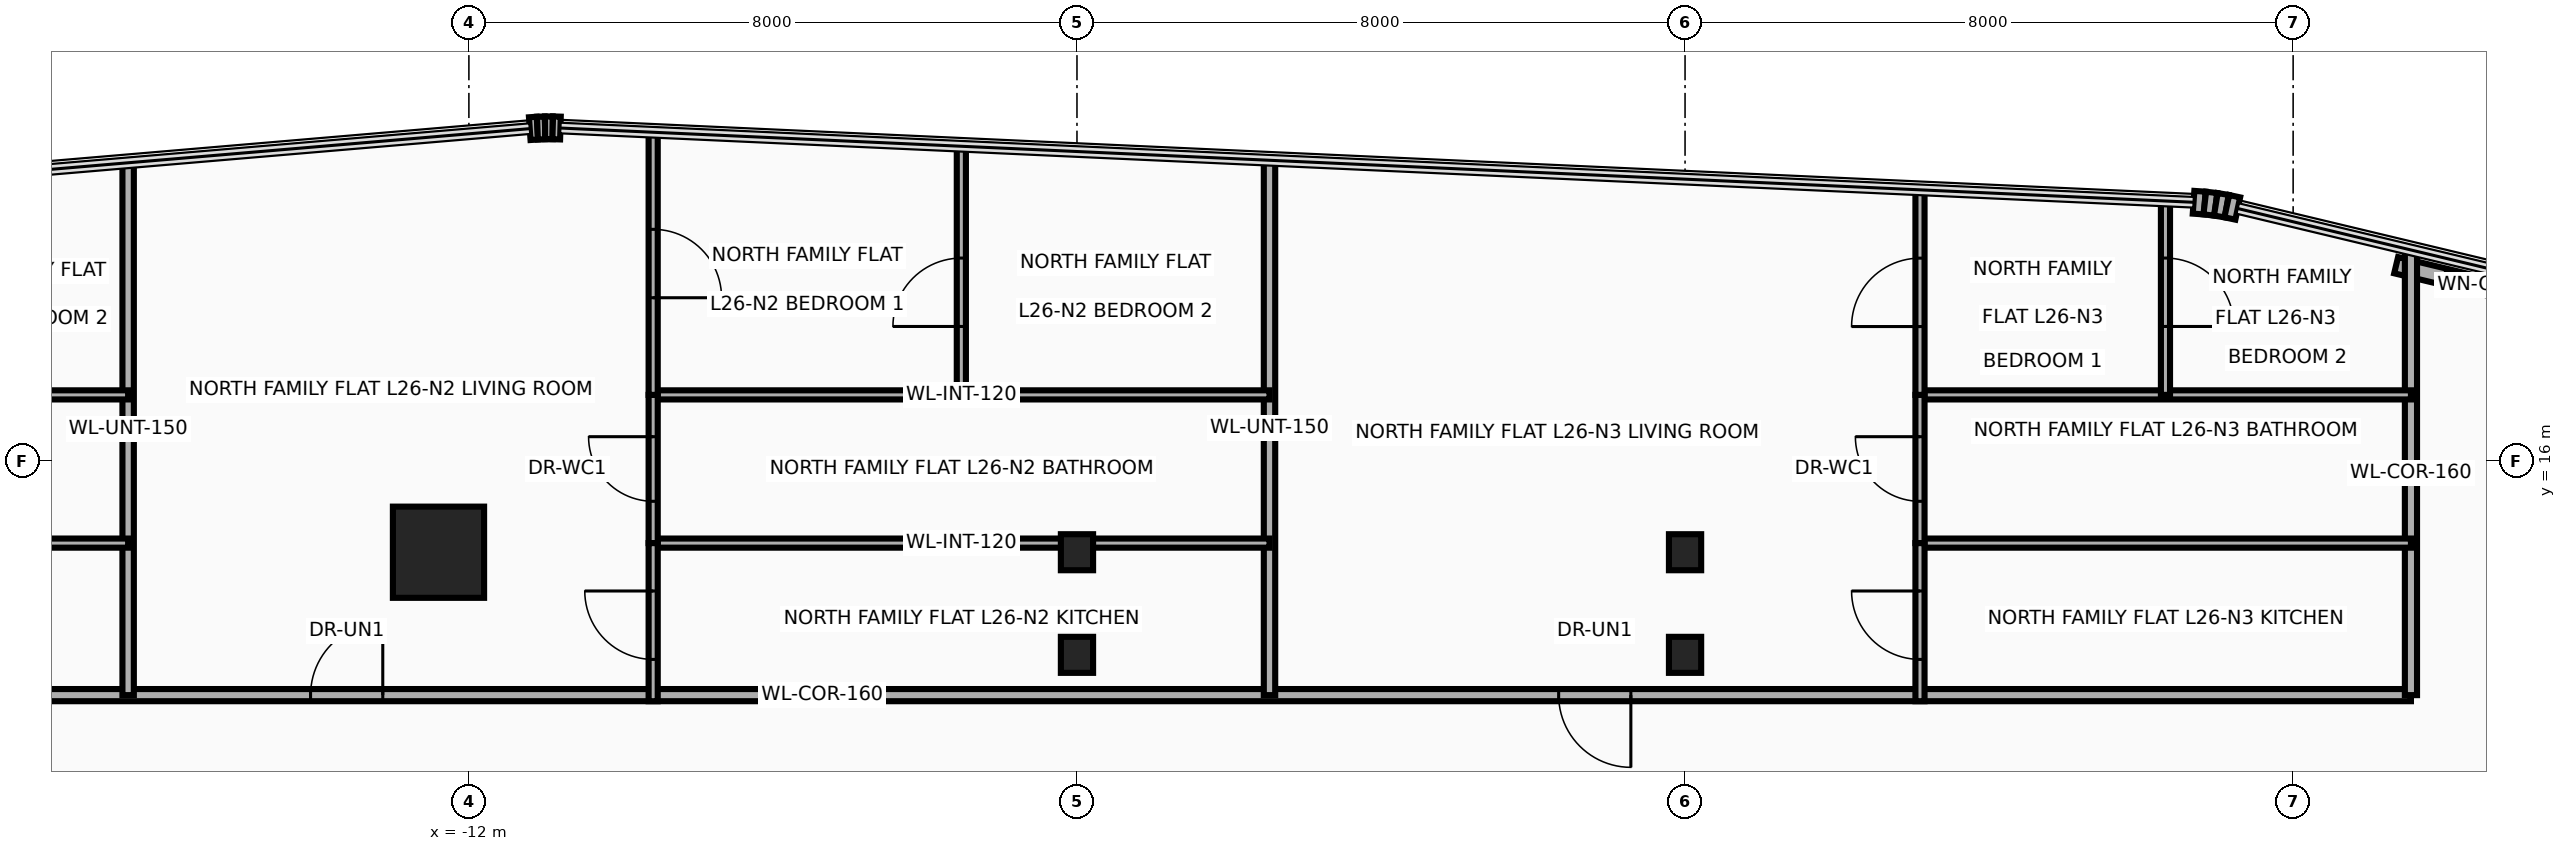
"""IFC4 building model, lengths in metres.
Left out: names, types, materials, properties, quantities, classifications, styles, units other than length and angle.
Written with IfcOpenShell. Run it as: python <this file> out.ifc"""

import sys

from ifc_helpers import new_model, si_unit, direction, frame, frame_2d, origin, origin_2d, place, context, subcontext, project, spatial, rectangle, i_section, extrude, source, transform, mapped, element, fill, save


model = new_model("IFC4")
c1 = context("Model", 3, precision=1e-05, world=origin(), true_north=direction((0.0, 1.0)))
c2 = subcontext(c1, "Body", "Model", "MODEL_VIEW")
j1 = project(units=[si_unit("LENGTHUNIT", "METRE"), si_unit("PLANEANGLEUNIT", "RADIAN")], contexts=[c1])
p1 = place(None, origin())
s1 = spatial("IfcSite", under=j1, at=p1, CompositionType="ELEMENT")
p2 = place(p1, origin())
s2 = spatial("IfcBuilding", under=s1, at=p2, CompositionType="ELEMENT")
p3 = place(p2, frame((0.0, 0.0, 105.7)))
s3 = spatial("IfcBuildingStorey", under=s2, at=p3, CompositionType="ELEMENT", Elevation=105.7)
m1 = source(origin(), c2, "Body", "SweptSolid", [
    extrude(rectangle(XDim=1.2, YDim=1.2, at=origin_2d()), origin(), (0.0, 0.0, 1.0), 3.7),
])
p4 = place(p3, frame((-12.4, 14.8, 0.0), z_axis=(0.0, 0.0, 1.0), x_axis=(1.0, 0.0, 0.0)))
e1 = element("IfcColumn", 1, at=p4, inside=s3, PredefinedType="COLUMN", context=c2, shape_type="MappedRepresentation", body=[
    mapped(m1, transform((0.0, 0.0, 0.0), x_axis=(1.0, 0.0, 0.0), y_axis=(0.0, 1.0, 0.0), z_axis=(0.0, 0.0, 1.0), scale=1.0)),
])
m2 = source(origin(), c2, "Body", "SweptSolid", [
    extrude(i_section(OverallWidth=0.424, OverallDepth=0.474, WebThickness=0.048, FlangeThickness=0.077, at=origin_2d()), origin(), (0.0, 0.0, 1.0), 3.7),
])
for number, where, z_axis, x_axis in (
    (2, (-4.0, 13.45, 0.0), (0.0, 0.0, 1.0), (1.0, 0.0, 0.0)),
    (3, (-4.0, 14.8, 0.0), (0.0, 0.0, 1.0), (1.0, 0.0, 0.0)),
    (4, (4.0, 13.45, 0.0), (0.0, 0.0, 1.0), (1.0, 0.0, 0.0)),
    (5, (4.0, 14.8, 0.0), (0.0, 0.0, 1.0), (1.0, 0.0, 0.0)),
):
    element("IfcColumn", number, at=place(p3, frame(where, z_axis=z_axis, x_axis=x_axis)), inside=s3, PredefinedType="COLUMN", context=c2, shape_type="MappedRepresentation", body=[
        mapped(m2, transform((0.0, 0.0, 0.0), x_axis=(1.0, 0.0, 0.0), y_axis=(0.0, 1.0, 0.0), z_axis=(0.0, 0.0, 1.0), scale=1.0)),
    ])
p5 = place(p3, frame((-11.199, 20.373, 0.0), z_axis=(0.0, 0.0, 1.0), x_axis=(0.997567332166, 0.069709524416, 0.0)))
e6 = element("IfcWall", 6, at=p5, inside=s3, PredefinedType="SOLIDWALL", context=c2, shape_type="SweptSolid", body=[
    extrude(rectangle(XDim=0.102, YDim=0.3, at=frame_2d((0.051, 0.0))), origin(), (0.0, 0.0, 1.0), 3.46),
])
p6 = place(p3, frame((-11.098, 20.38, 0.0), z_axis=(0.0, 0.0, 1.0), x_axis=(0.999334672785, 0.03647206835, 0.0)))
e7 = element("IfcWall", 7, at=p6, inside=s3, PredefinedType="SOLIDWALL", context=c2, shape_type="SweptSolid", body=[
    extrude(rectangle(XDim=0.1, YDim=0.3, at=frame_2d((0.05, 0.0))), origin(), (0.0, 0.0, 1.0), 3.46),
])
p7 = place(p3, frame((-10.998, 20.383, 0.0), z_axis=(0.0, 0.0, 1.0), x_axis=(0.999997054401, 0.002427177317, 0.0)))
e8 = element("IfcWall", 8, at=p7, inside=s3, PredefinedType="SOLIDWALL", context=c2, shape_type="SweptSolid", body=[
    extrude(rectangle(XDim=0.101, YDim=0.3, at=frame_2d((0.05, 0.0))), origin(), (0.0, 0.0, 1.0), 3.46),
])
p8 = place(p3, frame((-10.897, 20.384, 0.0), z_axis=(0.0, 0.0, 1.0), x_axis=(0.999584209171, -0.02883415988, 0.0)))
e9 = element("IfcWall", 9, at=p8, inside=s3, PredefinedType="SOLIDWALL", context=c2, shape_type="SweptSolid", body=[
    extrude(rectangle(XDim=0.102, YDim=0.3, at=frame_2d((0.051, 0.0))), origin(), (0.0, 0.0, 1.0), 3.46),
])
p9 = place(p3, frame((10.69, 19.404, 0.0), z_axis=(0.0, 0.0, 1.0), x_axis=(0.99758310784, -0.069483400546, 0.0)))
e10 = element("IfcWall", 10, at=p9, inside=s3, PredefinedType="SOLIDWALL", context=c2, shape_type="SweptSolid", body=[
    extrude(rectangle(XDim=0.147, YDim=0.3, at=frame_2d((0.074, 0.0))), origin(), (0.0, 0.0, 1.0), 3.46),
])
for number, where, z_axis, x_axis in (
    (11, (10.837, 19.394, 0.0), (0.0, 0.0, 1.0), (0.993, -0.117, 0.0)),
    (12, (10.983, 19.377, 0.0), (0.0, 0.0, 1.0), (0.987, -0.163, 0.0)),
):
    element("IfcWall", number, at=place(p3, frame(where, z_axis=z_axis, x_axis=x_axis)), inside=s3, PredefinedType="SOLIDWALL", context=c2, shape_type="SweptSolid", body=[
        extrude(rectangle(XDim=0.146, YDim=0.3, at=frame_2d((0.073, 0.0))), origin(), (0.0, 0.0, 1.0), 3.46),
    ])
p10 = place(p3, frame((11.127, 19.353, 0.0), z_axis=(0.0, 0.0, 1.0), x_axis=(0.978019841688, -0.208511844421, 0.0)))
e13 = element("IfcWall", 13, at=p10, inside=s3, PredefinedType="SOLIDWALL", context=c2, shape_type="SweptSolid", body=[
    extrude(rectangle(XDim=0.147, YDim=0.3, at=frame_2d((0.074, 0.0))), origin(), (0.0, 0.0, 1.0), 3.46),
])
p11 = place(p3, frame((13.355, 18.576, 0.0), z_axis=(0.0, 0.0, 1.0), x_axis=(0.97252211384, -0.232810519721, 0.0)))
e14 = element("IfcWall", 14, at=p11, inside=s3, PredefinedType="SOLIDWALL", context=c2, shape_type="SweptSolid", body=[
    extrude(rectangle(XDim=2.2, YDim=0.22, at=frame_2d((1.1, 0.0))), origin(), (0.0, 0.0, 1.0), 3.46),
])
p12 = place(p11, frame((0.65, 0.0, 0.95)))
e15 = element("IfcOpeningElement", 15, at=p12, cuts=e14, PredefinedType="OPENING", context=c2, shape_type="SweptSolid", body=[
    extrude(rectangle(XDim=0.9, YDim=1.3, at=frame_2d((0.45, 0.65))), frame((0.0, 0.125, 0.0), z_axis=(0.0, -1.0, 0.0), x_axis=(1.0, 0.0, 0.0)), (0.0, 0.0, 1.0), 0.25),
])
p13 = place(p3, frame((-28.25, 12.92, 0.0), z_axis=(0.0, 0.0, 1.0), x_axis=(1.0, 0.0, 0.0)))
e16 = element("IfcWall", 16, at=p13, inside=s3, PredefinedType="PARTITIONING", context=c2, shape_type="SweptSolid", body=[
    extrude(rectangle(XDim=41.8, YDim=0.16, at=frame_2d((20.9, 0.0))), origin(), (0.0, 0.0, 1.0), 2.666),
])
p14 = place(p13, frame((1.456, 0.0, 0.0)))
e17 = element("IfcOpeningElement", 17, at=p14, cuts=e16, PredefinedType="OPENING", context=c2, shape_type="SweptSolid", body=[
    extrude(rectangle(XDim=0.95, YDim=2.15, at=frame_2d((0.475, 1.075))), frame((0.0, 0.095, 0.0), z_axis=(0.0, -1.0, 0.0), x_axis=(1.0, 0.0, 0.0)), (0.0, 0.0, 1.0), 0.19),
])
p15 = place(p13, frame((14.167, 0.0, 0.0)))
e18 = element("IfcOpeningElement", 18, at=p15, cuts=e16, PredefinedType="OPENING", context=c2, shape_type="SweptSolid", body=[
    extrude(rectangle(XDim=0.95, YDim=2.15, at=frame_2d((0.475, 1.075))), frame((0.0, 0.095, 0.0), z_axis=(0.0, -1.0, 0.0), x_axis=(1.0, 0.0, 0.0)), (0.0, 0.0, 1.0), 0.19),
])
p16 = place(p13, frame((30.587, 0.0, 0.0)))
e19 = element("IfcOpeningElement", 19, at=p16, cuts=e16, PredefinedType="OPENING", context=c2, shape_type="SweptSolid", body=[
    extrude(rectangle(XDim=0.95, YDim=2.15, at=frame_2d((0.475, 1.075))), frame((0.0, 0.095, 0.0), z_axis=(0.0, -1.0, 0.0), x_axis=(1.0, 0.0, 0.0)), (0.0, 0.0, 1.0), 0.19),
])
p17 = place(p3, frame((13.55, 12.92, 0.0), z_axis=(0.0, 0.0, 1.0), x_axis=(0.0, 1.0, 0.0)))
e20 = element("IfcWall", 20, at=p17, inside=s3, PredefinedType="PARTITIONING", context=c2, shape_type="SweptSolid", body=[
    extrude(rectangle(XDim=5.857, YDim=0.16, at=frame_2d((2.928, 0.0))), origin(), (0.0, 0.0, 1.0), 2.666),
])
p18 = place(p3, frame((-16.483, 12.92, 0.0), z_axis=(0.0, 0.0, 1.0), x_axis=(0.0, 1.0, 0.0)))
e21 = element("IfcWall", 21, at=p18, inside=s3, PredefinedType="PARTITIONING", context=c2, shape_type="SweptSolid", body=[
    extrude(rectangle(XDim=7.004, YDim=0.15, at=frame_2d((3.502, 0.0))), origin(), (0.0, 0.0, 1.0), 2.666),
])
p19 = place(p3, frame((-1.467, 12.92, 0.0), z_axis=(0.0, 0.0, 1.0), x_axis=(0.0, 1.0, 0.0)))
e22 = element("IfcWall", 22, at=p19, inside=s3, PredefinedType="PARTITIONING", context=c2, shape_type="SweptSolid", body=[
    extrude(rectangle(XDim=7.037, YDim=0.15, at=frame_2d((3.518, 0.0))), origin(), (0.0, 0.0, 1.0), 2.666),
])
p20 = place(p3, frame((-24.387, 14.92, 0.0), z_axis=(0.0, 0.0, 1.0), x_axis=(1.0, 0.0, 0.0)))
e23 = element("IfcWall", 23, at=p20, inside=s3, PredefinedType="PARTITIONING", context=c2, shape_type="SweptSolid", body=[
    extrude(rectangle(XDim=7.904, YDim=0.12, at=frame_2d((3.952, 0.0))), origin(), (0.0, 0.0, 1.0), 2.666),
])
p21 = place(p3, frame((-24.387, 16.87, 0.0), z_axis=(0.0, 0.0, 1.0), x_axis=(1.0, 0.0, 0.0)))
e24 = element("IfcWall", 24, at=p21, inside=s3, PredefinedType="PARTITIONING", context=c2, shape_type="SweptSolid", body=[
    extrude(rectangle(XDim=7.904, YDim=0.12, at=frame_2d((3.952, 0.0))), origin(), (0.0, 0.0, 1.0), 3.46),
])
p22 = place(p3, frame((-9.576, 14.92, 0.0), z_axis=(0.0, 0.0, 1.0), x_axis=(1.0, 0.0, 0.0)))
e25 = element("IfcWall", 25, at=p22, inside=s3, PredefinedType="PARTITIONING", context=c2, shape_type="SweptSolid", body=[
    extrude(rectangle(XDim=8.109, YDim=0.12, at=frame_2d((4.054, 0.0))), origin(), (0.0, 0.0, 1.0), 2.666),
])
p23 = place(p3, frame((-9.576, 16.87, 0.0), z_axis=(0.0, 0.0, 1.0), x_axis=(1.0, 0.0, 0.0)))
e26 = element("IfcWall", 26, at=p23, inside=s3, PredefinedType="PARTITIONING", context=c2, shape_type="SweptSolid", body=[
    extrude(rectangle(XDim=8.109, YDim=0.12, at=frame_2d((4.054, 0.0))), origin(), (0.0, 0.0, 1.0), 3.46),
])
p24 = place(p3, frame((-9.576, 14.92, 0.0), z_axis=(0.0, 0.0, 1.0), x_axis=(0.0, 1.0, 0.0)))
e27 = element("IfcWall", 27, at=p24, inside=s3, PredefinedType="PARTITIONING", context=c2, shape_type="SweptSolid", body=[
    extrude(rectangle(XDim=1.95, YDim=0.12, at=frame_2d((0.975, 0.0))), origin(), (0.0, 0.0, 1.0), 2.666),
])
p25 = place(p24, frame((0.55, 0.0, 0.0)))
e28 = element("IfcOpeningElement", 28, at=p25, cuts=e27, PredefinedType="OPENING", context=c2, shape_type="SweptSolid", body=[
    extrude(rectangle(XDim=0.85, YDim=2.1, at=frame_2d((0.425, 1.05))), frame((0.0, 0.075, 0.0), z_axis=(0.0, -1.0, 0.0), x_axis=(1.0, 0.0, 0.0)), (0.0, 0.0, 1.0), 0.15),
])
p26 = place(p3, frame((-9.576, 12.84, 0.0), z_axis=(0.0, 0.0, 1.0), x_axis=(0.0, 1.0, 0.0)))
e29 = element("IfcWall", 29, at=p26, inside=s3, PredefinedType="PARTITIONING", context=c2, shape_type="SweptSolid", body=[
    extrude(rectangle(XDim=2.08, YDim=0.12, at=frame_2d((1.04, 0.0))), origin(), (0.0, 0.0, 1.0), 2.666),
])
p27 = place(p26, frame((0.55, 0.0, 0.0)))
e30 = element("IfcOpeningElement", 30, at=p27, cuts=e29, PredefinedType="OPENING", context=c2, shape_type="SweptSolid", body=[
    extrude(rectangle(XDim=0.9, YDim=2.1, at=frame_2d((0.45, 1.05))), frame((0.0, 0.075, 0.0), z_axis=(0.0, -1.0, 0.0), x_axis=(1.0, 0.0, 0.0)), (0.0, 0.0, 1.0), 0.15),
])
p28 = place(p3, frame((-9.576, 16.87, 0.0), z_axis=(0.0, 0.0, 1.0), x_axis=(0.0, 1.0, 0.0)))
e31 = element("IfcWall", 31, at=p28, inside=s3, PredefinedType="PARTITIONING", context=c2, shape_type="SweptSolid", body=[
    extrude(rectangle(XDim=3.455, YDim=0.12, at=frame_2d((1.728, 0.0))), origin(), (0.0, 0.0, 1.0), 3.46),
])
p29 = place(p28, frame((1.278, 0.0, 0.0)))
e32 = element("IfcOpeningElement", 32, at=p29, cuts=e31, PredefinedType="OPENING", context=c2, shape_type="SweptSolid", body=[
    extrude(rectangle(XDim=0.9, YDim=2.1, at=frame_2d((0.45, 1.05))), frame((0.0, 0.075, 0.0), z_axis=(0.0, -1.0, 0.0), x_axis=(1.0, 0.0, 0.0)), (0.0, 0.0, 1.0), 0.15),
])
p30 = place(p3, frame((-5.521, 16.87, 0.0), z_axis=(0.0, 0.0, 1.0), x_axis=(0.0, 1.0, 0.0)))
e33 = element("IfcWall", 33, at=p30, inside=s3, PredefinedType="PARTITIONING", context=c2, shape_type="SweptSolid", body=[
    extrude(rectangle(XDim=3.271, YDim=0.12, at=frame_2d((1.635, 0.0))), origin(), (0.0, 0.0, 1.0), 3.46),
])
p31 = place(p30, frame((0.9, 0.0, 0.0)))
e34 = element("IfcOpeningElement", 34, at=p31, cuts=e33, PredefinedType="OPENING", context=c2, shape_type="SweptSolid", body=[
    extrude(rectangle(XDim=0.9, YDim=2.1, at=frame_2d((0.45, 1.05))), frame((0.0, 0.075, 0.0), z_axis=(0.0, -1.0, 0.0), x_axis=(1.0, 0.0, 0.0)), (0.0, 0.0, 1.0), 0.15),
])
for number, where, z_axis, x_axis in (
    (35, (7.091, 14.92, 0.0), (0.0, 0.0, 1.0), (1.0, 0.0, 0.0)),
    (36, (7.091, 16.87, 0.0), (0.0, 0.0, 1.0), (1.0, 0.0, 0.0)),
):
    element("IfcWall", number, at=place(p3, frame(where, z_axis=z_axis, x_axis=x_axis)), inside=s3, PredefinedType="PARTITIONING", context=c2, shape_type="SweptSolid", body=[
        extrude(rectangle(XDim=6.459, YDim=0.12, at=frame_2d((3.229, 0.0))), origin(), (0.0, 0.0, 1.0), 3.46),
    ])
p32 = place(p3, frame((7.091, 14.92, 0.0), z_axis=(0.0, 0.0, 1.0), x_axis=(0.0, 1.0, 0.0)))
e37 = element("IfcWall", 37, at=p32, inside=s3, PredefinedType="PARTITIONING", context=c2, shape_type="SweptSolid", body=[
    extrude(rectangle(XDim=1.95, YDim=0.12, at=frame_2d((0.975, 0.0))), origin(), (0.0, 0.0, 1.0), 3.46),
])
p33 = place(p32, frame((0.55, 0.0, 0.0)))
e38 = element("IfcOpeningElement", 38, at=p33, cuts=e37, PredefinedType="OPENING", context=c2, shape_type="SweptSolid", body=[
    extrude(rectangle(XDim=0.85, YDim=2.1, at=frame_2d((0.425, 1.05))), frame((0.0, 0.075, 0.0), z_axis=(0.0, -1.0, 0.0), x_axis=(1.0, 0.0, 0.0)), (0.0, 0.0, 1.0), 0.15),
])
p34 = place(p3, frame((7.091, 12.84, 0.0), z_axis=(0.0, 0.0, 1.0), x_axis=(0.0, 1.0, 0.0)))
e39 = element("IfcWall", 39, at=p34, inside=s3, PredefinedType="PARTITIONING", context=c2, shape_type="SweptSolid", body=[
    extrude(rectangle(XDim=2.08, YDim=0.12, at=frame_2d((1.04, 0.0))), origin(), (0.0, 0.0, 1.0), 2.666),
])
p35 = place(p34, frame((0.55, 0.0, 0.0)))
e40 = element("IfcOpeningElement", 40, at=p35, cuts=e39, PredefinedType="OPENING", context=c2, shape_type="SweptSolid", body=[
    extrude(rectangle(XDim=0.9, YDim=2.1, at=frame_2d((0.45, 1.05))), frame((0.0, 0.075, 0.0), z_axis=(0.0, -1.0, 0.0), x_axis=(1.0, 0.0, 0.0)), (0.0, 0.0, 1.0), 0.15),
])
p36 = place(p3, frame((7.091, 16.87, 0.0), z_axis=(0.0, 0.0, 1.0), x_axis=(0.0, 1.0, 0.0)))
e41 = element("IfcWall", 41, at=p36, inside=s3, PredefinedType="PARTITIONING", context=c2, shape_type="SweptSolid", body=[
    extrude(rectangle(XDim=2.698, YDim=0.12, at=frame_2d((1.349, 0.0))), origin(), (0.0, 0.0, 1.0), 3.46),
])
p37 = place(p36, frame((0.899, 0.0, 0.0)))
e42 = element("IfcOpeningElement", 42, at=p37, cuts=e41, PredefinedType="OPENING", context=c2, shape_type="SweptSolid", body=[
    extrude(rectangle(XDim=0.9, YDim=2.1, at=frame_2d((0.45, 1.05))), frame((0.0, 0.075, 0.0), z_axis=(0.0, -1.0, 0.0), x_axis=(1.0, 0.0, 0.0)), (0.0, 0.0, 1.0), 0.15),
])
p38 = place(p3, frame((10.32, 16.87, 0.0), z_axis=(0.0, 0.0, 1.0), x_axis=(0.0, 1.0, 0.0)))
e43 = element("IfcWall", 43, at=p38, inside=s3, PredefinedType="PARTITIONING", context=c2, shape_type="SweptSolid", body=[
    extrude(rectangle(XDim=2.551, YDim=0.12, at=frame_2d((1.275, 0.0))), origin(), (0.0, 0.0, 1.0), 3.46),
])
p39 = place(p38, frame((0.9, 0.0, 0.0)))
e44 = element("IfcOpeningElement", 44, at=p39, cuts=e43, PredefinedType="OPENING", context=c2, shape_type="SweptSolid", body=[
    extrude(rectangle(XDim=0.9, YDim=2.1, at=frame_2d((0.45, 1.05))), frame((0.0, 0.075, 0.0), z_axis=(0.0, -1.0, 0.0), x_axis=(1.0, 0.0, 0.0)), (0.0, 0.0, 1.0), 0.15),
])
p40 = place(p12, origin())
e45 = element("IfcWindow", 45, at=p40, inside=s3, PartitioningType="SINGLE_PANEL", PredefinedType="WINDOW", context=c2, shape_type="SweptSolid", body=[
    extrude(rectangle(XDim=0.9, YDim=1.3, at=frame_2d((0.45, 0.65))), frame((0.0, 0.03, 0.0), z_axis=(0.0, -1.0, 0.0), x_axis=(1.0, 0.0, 0.0)), (0.0, 0.0, 1.0), 0.06),
])
fill(e15, e45)
p41 = place(p15, origin())
e46 = element("IfcDoor", 46, at=p41, inside=s3, OperationType="SINGLE_SWING_RIGHT", PredefinedType="DOOR", context=c2, shape_type="SweptSolid", body=[
    extrude(rectangle(XDim=0.95, YDim=2.15, at=frame_2d((0.475, 1.075))), frame((0.0, 0.025, 0.0), z_axis=(0.0, -1.0, 0.0), x_axis=(1.0, 0.0, 0.0)), (0.0, 0.0, 1.0), 0.05),
])
fill(e18, e46)
p42 = place(p25, origin())
e47 = element("IfcDoor", 47, at=p42, inside=s3, OperationType="SINGLE_SWING_LEFT", PredefinedType="DOOR", context=c2, shape_type="SweptSolid", body=[
    extrude(rectangle(XDim=0.85, YDim=2.1, at=frame_2d((0.425, 1.05))), frame((0.0, 0.025, 0.0), z_axis=(0.0, -1.0, 0.0), x_axis=(1.0, 0.0, 0.0)), (0.0, 0.0, 1.0), 0.05),
])
fill(e28, e47)
p43 = place(p27, origin())
e48 = element("IfcDoor", 48, at=p43, inside=s3, OperationType="SINGLE_SWING_RIGHT", PredefinedType="DOOR", context=c2, shape_type="SweptSolid", body=[
    extrude(rectangle(XDim=0.9, YDim=2.1, at=frame_2d((0.45, 1.05))), frame((0.0, 0.025, 0.0), z_axis=(0.0, -1.0, 0.0), x_axis=(1.0, 0.0, 0.0)), (0.0, 0.0, 1.0), 0.05),
])
fill(e30, e48)
p44 = place(p29, frame((0.9, 0.0, 0.0), z_axis=(0.0, 0.0, 1.0), x_axis=(-1.0, 0.0, 0.0)))
e49 = element("IfcDoor", 49, at=p44, inside=s3, OperationType="SINGLE_SWING_LEFT", PredefinedType="DOOR", context=c2, shape_type="SweptSolid", body=[
    extrude(rectangle(XDim=0.9, YDim=2.1, at=frame_2d((0.45, 1.05))), frame((0.0, 0.025, 0.0), z_axis=(0.0, -1.0, 0.0), x_axis=(1.0, 0.0, 0.0)), (0.0, 0.0, 1.0), 0.05),
])
fill(e32, e49)
p45 = place(p31, origin())
e50 = element("IfcDoor", 50, at=p45, inside=s3, OperationType="SINGLE_SWING_RIGHT", PredefinedType="DOOR", context=c2, shape_type="SweptSolid", body=[
    extrude(rectangle(XDim=0.9, YDim=2.1, at=frame_2d((0.45, 1.05))), frame((0.0, 0.025, 0.0), z_axis=(0.0, -1.0, 0.0), x_axis=(1.0, 0.0, 0.0)), (0.0, 0.0, 1.0), 0.05),
])
fill(e34, e50)
p46 = place(p16, frame((0.95, 0.0, 0.0), z_axis=(0.0, 0.0, 1.0), x_axis=(-1.0, 0.0, 0.0)))
e51 = element("IfcDoor", 51, at=p46, inside=s3, OperationType="SINGLE_SWING_LEFT", PredefinedType="DOOR", context=c2, shape_type="SweptSolid", body=[
    extrude(rectangle(XDim=0.95, YDim=2.15, at=frame_2d((0.475, 1.075))), frame((0.0, 0.025, 0.0), z_axis=(0.0, -1.0, 0.0), x_axis=(1.0, 0.0, 0.0)), (0.0, 0.0, 1.0), 0.05),
])
fill(e19, e51)
p47 = place(p33, origin())
e52 = element("IfcDoor", 52, at=p47, inside=s3, OperationType="SINGLE_SWING_RIGHT", PredefinedType="DOOR", context=c2, shape_type="SweptSolid", body=[
    extrude(rectangle(XDim=0.85, YDim=2.1, at=frame_2d((0.425, 1.05))), frame((0.0, 0.025, 0.0), z_axis=(0.0, -1.0, 0.0), x_axis=(1.0, 0.0, 0.0)), (0.0, 0.0, 1.0), 0.05),
])
fill(e38, e52)
p48 = place(p35, origin())
e53 = element("IfcDoor", 53, at=p48, inside=s3, OperationType="SINGLE_SWING_LEFT", PredefinedType="DOOR", context=c2, shape_type="SweptSolid", body=[
    extrude(rectangle(XDim=0.9, YDim=2.1, at=frame_2d((0.45, 1.05))), frame((0.0, 0.025, 0.0), z_axis=(0.0, -1.0, 0.0), x_axis=(1.0, 0.0, 0.0)), (0.0, 0.0, 1.0), 0.05),
])
fill(e40, e53)
p49 = place(p37, origin())
e54 = element("IfcDoor", 54, at=p49, inside=s3, OperationType="SINGLE_SWING_RIGHT", PredefinedType="DOOR", context=c2, shape_type="SweptSolid", body=[
    extrude(rectangle(XDim=0.9, YDim=2.1, at=frame_2d((0.45, 1.05))), frame((0.0, 0.025, 0.0), z_axis=(0.0, -1.0, 0.0), x_axis=(1.0, 0.0, 0.0)), (0.0, 0.0, 1.0), 0.05),
])
fill(e42, e54)
p50 = place(p39, frame((0.9, 0.0, 0.0), z_axis=(0.0, 0.0, 1.0), x_axis=(-1.0, 0.0, 0.0)))
e55 = element("IfcDoor", 55, at=p50, inside=s3, OperationType="SINGLE_SWING_LEFT", PredefinedType="DOOR", context=c2, shape_type="SweptSolid", body=[
    extrude(rectangle(XDim=0.9, YDim=2.1, at=frame_2d((0.45, 1.05))), frame((0.0, 0.025, 0.0), z_axis=(0.0, -1.0, 0.0), x_axis=(1.0, 0.0, 0.0)), (0.0, 0.0, 1.0), 0.05),
])
fill(e44, e55)
save(model, sys.argv[1])
